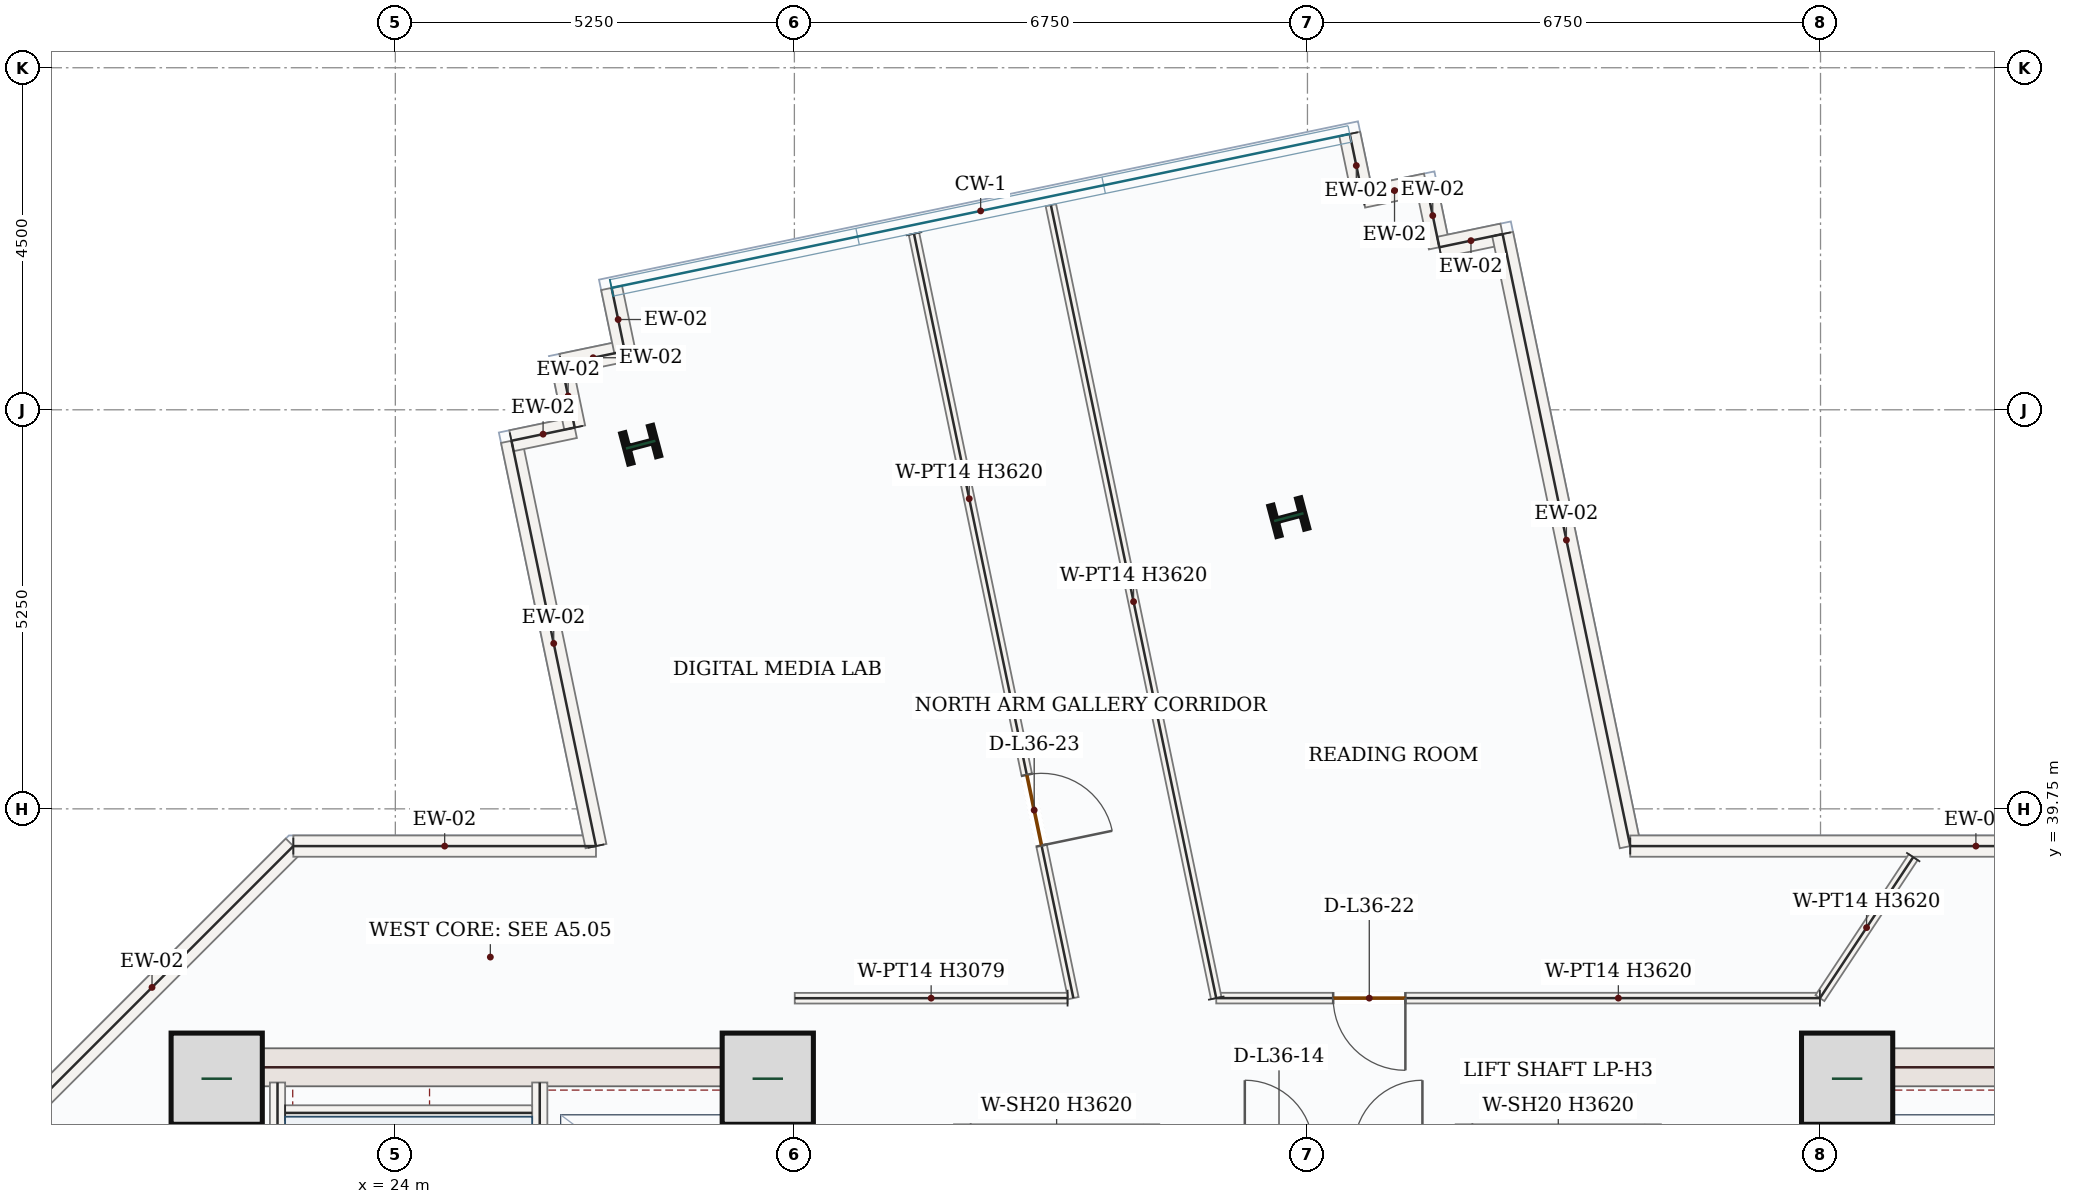
"""IFC4 building model, lengths in metres.
Left out: names, types, materials, properties, quantities, classifications, styles, units other than length and angle.
Written with IfcOpenShell. Run it as: python <this file> out.ifc"""

import sys

from ifc_helpers import new_model, si_unit, direction, frame, frame_2d, origin, origin_2d, place, context, subcontext, project, spatial, rectangle, i_section, extrude, source, transform, mapped, element, fill, save


model = new_model("IFC4")
c1 = context("Model", 3, precision=1e-05, world=origin(), true_north=direction((0.0, 1.0)))
c2 = subcontext(c1, "Body", "Model", "MODEL_VIEW")
j1 = project(units=[si_unit("LENGTHUNIT", "METRE"), si_unit("PLANEANGLEUNIT", "RADIAN")], contexts=[c1])
p1 = place(None, origin())
s1 = spatial("IfcSite", under=j1, at=p1, CompositionType="ELEMENT")
p2 = place(p1, origin())
s2 = spatial("IfcBuilding", under=s1, at=p2, CompositionType="ELEMENT")
p3 = place(p2, frame((0.0, 0.0, 159.0)))
s3 = spatial("IfcBuildingStorey", under=s2, at=p3, CompositionType="ELEMENT", Elevation=159.0)
m1 = source(origin(), c2, "Body", "SweptSolid", [
    extrude(rectangle(XDim=8.55, YDim=0.5, at=frame_2d((4.275, 0.0))), origin(), (0.0, 0.0, 1.0), 3.62),
])
p4 = place(p3, frame((21.5, 28.05, 0.0), z_axis=(0.0, 0.0, 1.0), x_axis=(0.0, 1.0, 0.0)))
e1 = element("IfcWall", 1, at=p4, inside=s3, PredefinedType="SHEAR", context=c2, shape_type="MappedRepresentation", body=[
    mapped(m1, transform((0.0, 0.0, 0.0), x_axis=(1.0, 0.0, 0.0), y_axis=(0.0, 1.0, 0.0), z_axis=(0.0, 0.0, 1.0), scale=1.0)),
])
p5 = place(p3, frame((29.0, 28.05, 0.0), z_axis=(0.0, 0.0, 1.0), x_axis=(0.0, 1.0, 0.0)))
e2 = element("IfcWall", 2, at=p5, inside=s3, PredefinedType="SHEAR", context=c2, shape_type="SweptSolid", body=[
    extrude(rectangle(XDim=8.55, YDim=0.5, at=frame_2d((4.275, 0.0))), origin(), (0.0, 0.0, 1.0), 3.62),
])
p6 = place(p5, frame((1.5, 0.0, 0.0)))
e3 = element("IfcOpeningElement", 3, at=p6, cuts=e2, PredefinedType="OPENING", context=c2, shape_type="SweptSolid", body=[
    extrude(rectangle(XDim=1.1, YDim=2.2, at=frame_2d((0.55, 1.1))), frame((0.0, 0.26, 0.0), z_axis=(0.0, -1.0, 0.0), x_axis=(1.0, 0.0, 0.0)), (0.0, 0.0, 1.0), 0.52),
])
m2 = source(origin(), c2, "Body", "SweptSolid", [
    extrude(rectangle(XDim=7.0, YDim=0.5, at=frame_2d((3.5, 0.0))), origin(), (0.0, 0.0, 1.0), 3.62),
])
p7 = place(p3, frame((21.75, 36.35, 0.0), z_axis=(0.0, 0.0, 1.0), x_axis=(1.0, 0.0, 0.0)))
e4 = element("IfcWall", 4, at=p7, inside=s3, PredefinedType="SHEAR", context=c2, shape_type="MappedRepresentation", body=[
    mapped(m2, transform((0.0, 0.0, 0.0), x_axis=(1.0, 0.0, 0.0), y_axis=(0.0, 1.0, 0.0), z_axis=(0.0, 0.0, 1.0), scale=1.0)),
])
p8 = place(p3, frame((43.0, 28.05, 0.0), z_axis=(0.0, 0.0, 1.0), x_axis=(0.0, 1.0, 0.0)))
e5 = element("IfcWall", 5, at=p8, inside=s3, PredefinedType="SHEAR", context=c2, shape_type="SweptSolid", body=[
    extrude(rectangle(XDim=8.55, YDim=0.5, at=frame_2d((4.275, 0.0))), origin(), (0.0, 0.0, 1.0), 3.62),
])
p9 = place(p8, frame((1.5, 0.0, 0.0)))
e6 = element("IfcOpeningElement", 6, at=p9, cuts=e5, PredefinedType="OPENING", context=c2, shape_type="SweptSolid", body=[
    extrude(rectangle(XDim=1.1, YDim=2.2, at=frame_2d((0.55, 1.1))), frame((0.0, 0.26, 0.0), z_axis=(0.0, -1.0, 0.0), x_axis=(1.0, 0.0, 0.0)), (0.0, 0.0, 1.0), 0.52),
])
p10 = place(p3, frame((43.25, 36.35, 0.0), z_axis=(0.0, 0.0, 1.0), x_axis=(1.0, 0.0, 0.0)))
e7 = element("IfcWall", 7, at=p10, inside=s3, PredefinedType="SHEAR", context=c2, shape_type="MappedRepresentation", body=[
    mapped(m2, transform((0.0, 0.0, 0.0), x_axis=(1.0, 0.0, 0.0), y_axis=(0.0, 1.0, 0.0), z_axis=(0.0, 0.0, 1.0), scale=1.0)),
])
m3 = source(origin(), c2, "Body", "SweptSolid", [
    extrude(rectangle(XDim=1.2, YDim=1.2, at=origin_2d()), origin(), (0.0, 0.0, 1.0), 3.9),
])
for number, where, z_axis, x_axis in (
    (8, (21.65, 36.2, 0.0), (0.0, 0.0, 1.0), (1.0, 0.0, 0.0)),
    (9, (28.9, 36.2, 0.0), (0.0, 0.0, 1.0), (1.0, 0.0, 0.0)),
    (10, (43.1, 36.2, 0.0), (0.0, 0.0, 1.0), (1.0, 0.0, 0.0)),
):
    element("IfcColumn", number, at=place(p3, frame(where, z_axis=z_axis, x_axis=x_axis)), inside=s3, PredefinedType="COLUMN", context=c2, shape_type="MappedRepresentation", body=[
        mapped(m3, transform((0.0, 0.0, 0.0), x_axis=(1.0, 0.0, 0.0), y_axis=(0.0, 1.0, 0.0), z_axis=(0.0, 0.0, 1.0), scale=1.0)),
    ])
m4 = source(origin(), c2, "Body", "SweptSolid", [
    extrude(i_section(OverallWidth=0.412, OverallDepth=0.435, WebThickness=0.036, FlangeThickness=0.057, FilletRadius=0.018, at=origin_2d()), origin(), (0.0, 0.0, 1.0), 3.9),
])
for number, where, z_axis, x_axis in (
    (11, (35.755, 43.588, 0.0), (0.0, 0.0, 1.0), (-0.255, 0.967, 0.0)),
    (12, (27.228, 44.541, 0.0), (0.0, 0.0, 1.0), (-0.255, 0.967, 0.0)),
):
    element("IfcColumn", number, at=place(p3, frame(where, z_axis=z_axis, x_axis=x_axis)), inside=s3, PredefinedType="COLUMN", context=c2, shape_type="MappedRepresentation", body=[
        mapped(m4, transform((0.0, 0.0, 0.0), x_axis=(1.0, 0.0, 0.0), y_axis=(0.0, 1.0, 0.0), z_axis=(0.0, 0.0, 1.0), scale=1.0)),
    ])
m5 = source(origin(), c2, "Body", "SweptSolid", [
    extrude(rectangle(XDim=5.258, YDim=0.28, at=frame_2d((2.629, 0.0))), origin(), (0.0, 0.0, 1.0), 3.62),
])
p11 = place(p3, frame((18.94, 35.542, 0.0), z_axis=(0.0, 0.0, 1.0), x_axis=(0.707106781187, 0.707106781187, 0.0)))
e13 = element("IfcWall", 13, at=p11, inside=s3, PredefinedType="SOLIDWALL", context=c2, shape_type="MappedRepresentation", body=[
    mapped(m5, transform((0.0, 0.0, 0.0), x_axis=(1.0, 0.0, 0.0), y_axis=(0.0, 1.0, 0.0), z_axis=(0.0, 0.0, 1.0), scale=1.0)),
])
m6 = source(origin(), c2, "Body", "SweptSolid", [
    extrude(rectangle(XDim=3.982, YDim=0.28, at=frame_2d((1.991, 0.0))), origin(), (0.0, 0.0, 1.0), 3.62),
])
p12 = place(p3, frame((22.658, 39.26, 0.0), z_axis=(0.0, 0.0, 1.0), x_axis=(1.0, 0.0, 0.0)))
e14 = element("IfcWall", 14, at=p12, inside=s3, PredefinedType="SOLIDWALL", context=c2, shape_type="MappedRepresentation", body=[
    mapped(m6, transform((0.0, 0.0, 0.0), x_axis=(1.0, 0.0, 0.0), y_axis=(0.0, 1.0, 0.0), z_axis=(0.0, 0.0, 1.0), scale=1.0)),
])
m7 = source(origin(), c2, "Body", "SweptSolid", [
    extrude(rectangle(XDim=5.447, YDim=0.28, at=frame_2d((2.724, 0.0))), origin(), (0.0, 0.0, 1.0), 3.62),
])
p13 = place(p3, frame((26.64, 39.26, 0.0), z_axis=(0.0, 0.0, 1.0), x_axis=(-0.204151126022, 0.978939384101, 0.0)))
e15 = element("IfcWall", 15, at=p13, inside=s3, PredefinedType="SOLIDWALL", context=c2, shape_type="MappedRepresentation", body=[
    mapped(m7, transform((0.0, 0.0, 0.0), x_axis=(1.0, 0.0, 0.0), y_axis=(0.0, 1.0, 0.0), z_axis=(0.0, 0.0, 1.0), scale=1.0)),
])
m8 = source(origin(), c2, "Body", "SweptSolid", [
    extrude(rectangle(XDim=0.85, YDim=0.28, at=frame_2d((0.425, 0.0))), origin(), (0.0, 0.0, 1.0), 3.62),
])
for number, where, z_axis, x_axis in (
    (16, (25.528, 44.593, 0.0), (0.0, 0.0, 1.0), (0.979, 0.204, 0.0)),
    (17, (26.36, 44.766, 0.0), (0.0, 0.0, 1.0), (-0.204, 0.979, 0.0)),
):
    element("IfcWall", number, at=place(p3, frame(where, z_axis=z_axis, x_axis=x_axis)), inside=s3, PredefinedType="SOLIDWALL", context=c2, shape_type="MappedRepresentation", body=[
        mapped(m8, transform((0.0, 0.0, 0.0), x_axis=(1.0, 0.0, 0.0), y_axis=(0.0, 1.0, 0.0), z_axis=(0.0, 0.0, 1.0), scale=1.0)),
    ])
m9 = source(origin(), c2, "Body", "SweptSolid", [
    extrude(rectangle(XDim=0.85, YDim=0.28, at=frame_2d((0.425, 0.0))), origin(), (0.0, 0.0, 1.0), 3.62),
])
p14 = place(p3, frame((26.186, 45.598, 0.0), z_axis=(0.0, 0.0, 1.0), x_axis=(0.97893500384, 0.204172128991, 0.0)))
e18 = element("IfcWall", 18, at=p14, inside=s3, PredefinedType="SOLIDWALL", context=c2, shape_type="MappedRepresentation", body=[
    mapped(m9, transform((0.0, 0.0, 0.0), x_axis=(1.0, 0.0, 0.0), y_axis=(0.0, 1.0, 0.0), z_axis=(0.0, 0.0, 1.0), scale=1.0)),
])
for number, where, z_axis, x_axis in (
    (19, (27.019, 45.772, 0.0), (0.0, 0.0, 1.0), (-0.204, 0.979, 0.0)),
    (20, (36.556, 48.629, 0.0), (0.0, 0.0, 1.0), (0.204, -0.979, 0.0)),
    (21, (36.729, 47.797, 0.0), (0.0, 0.0, 1.0), (0.979, 0.204, 0.0)),
    (22, (37.562, 47.97, 0.0), (0.0, 0.0, 1.0), (0.204, -0.979, 0.0)),
):
    element("IfcWall", number, at=place(p3, frame(where, z_axis=z_axis, x_axis=x_axis)), inside=s3, PredefinedType="SOLIDWALL", context=c2, shape_type="MappedRepresentation", body=[
        mapped(m8, transform((0.0, 0.0, 0.0), x_axis=(1.0, 0.0, 0.0), y_axis=(0.0, 1.0, 0.0), z_axis=(0.0, 0.0, 1.0), scale=1.0)),
    ])
p15 = place(p3, frame((37.735, 47.138, 0.0), z_axis=(0.0, 0.0, 1.0), x_axis=(0.97893500384, 0.204172128991, 0.0)))
e23 = element("IfcWall", 23, at=p15, inside=s3, PredefinedType="SOLIDWALL", context=c2, shape_type="MappedRepresentation", body=[
    mapped(m9, transform((0.0, 0.0, 0.0), x_axis=(1.0, 0.0, 0.0), y_axis=(0.0, 1.0, 0.0), z_axis=(0.0, 0.0, 1.0), scale=1.0)),
])
m10 = source(origin(), c2, "Body", "SweptSolid", [
    extrude(rectangle(XDim=8.225, YDim=0.28, at=frame_2d((4.113, 0.0))), origin(), (0.0, 0.0, 1.0), 3.62),
])
p16 = place(p3, frame((38.567, 47.312, 0.0), z_axis=(0.0, 0.0, 1.0), x_axis=(0.204152195211, -0.978939161128, 0.0)))
e24 = element("IfcWall", 24, at=p16, inside=s3, PredefinedType="SOLIDWALL", context=c2, shape_type="MappedRepresentation", body=[
    mapped(m10, transform((0.0, 0.0, 0.0), x_axis=(1.0, 0.0, 0.0), y_axis=(0.0, 1.0, 0.0), z_axis=(0.0, 0.0, 1.0), scale=1.0)),
])
m11 = source(origin(), c2, "Body", "SweptSolid", [
    extrude(rectangle(XDim=9.095, YDim=0.28, at=frame_2d((4.548, 0.0))), origin(), (0.0, 0.0, 1.0), 3.62),
])
p17 = place(p3, frame((40.247, 39.26, 0.0), z_axis=(0.0, 0.0, 1.0), x_axis=(1.0, 0.0, 0.0)))
e25 = element("IfcWall", 25, at=p17, inside=s3, PredefinedType="SOLIDWALL", context=c2, shape_type="MappedRepresentation", body=[
    mapped(m11, transform((0.0, 0.0, 0.0), x_axis=(1.0, 0.0, 0.0), y_axis=(0.0, 1.0, 0.0), z_axis=(0.0, 0.0, 1.0), scale=1.0)),
])
m12 = source(origin(), c2, "Body", "SweptSolid", [
    extrude(rectangle(XDim=7.87, YDim=0.2, at=frame_2d((3.935, 0.0))), origin(), (0.0, 0.0, 1.0), 3.62),
])
p18 = place(p3, frame((22.45, 28.28, 0.0), z_axis=(0.0, 0.0, 1.0), x_axis=(0.0, 1.0, 0.0)))
e26 = element("IfcWall", 26, at=p18, inside=s3, PredefinedType="SOLIDWALL", context=c2, shape_type="MappedRepresentation", body=[
    mapped(m12, transform((0.0, 0.0, 0.0), x_axis=(1.0, 0.0, 0.0), y_axis=(0.0, 1.0, 0.0), z_axis=(0.0, 0.0, 1.0), scale=1.0)),
])
p19 = place(p3, frame((25.9, 28.15, 0.0), z_axis=(0.0, 0.0, 1.0), x_axis=(0.0, 1.0, 0.0)))
e27 = element("IfcWall", 27, at=p19, inside=s3, PredefinedType="SOLIDWALL", context=c2, shape_type="SweptSolid", body=[
    extrude(rectangle(XDim=8.0, YDim=0.2, at=frame_2d((4.0, 0.0))), origin(), (0.0, 0.0, 1.0), 3.62),
])
p20 = place(p19, frame((0.4, 0.0, 0.0)))
e28 = element("IfcOpeningElement", 28, at=p20, cuts=e27, PredefinedType="OPENING", context=c2, shape_type="SweptSolid", body=[
    extrude(rectangle(XDim=1.05, YDim=2.15, at=frame_2d((0.525, 1.075))), frame((0.0, 0.11, 0.0), z_axis=(0.0, -1.0, 0.0), x_axis=(1.0, 0.0, 0.0)), (0.0, 0.0, 1.0), 0.22),
])
m13 = source(origin(), c2, "Body", "SweptSolid", [
    extrude(rectangle(XDim=3.25, YDim=0.2, at=frame_2d((1.625, 0.0))), origin(), (0.0, 0.0, 1.0), 3.62),
])
p21 = place(p3, frame((22.55, 35.75, 0.0), z_axis=(0.0, 0.0, 1.0), x_axis=(1.0, 0.0, 0.0)))
e29 = element("IfcWall", 29, at=p21, inside=s3, PredefinedType="SOLIDWALL", context=c2, shape_type="MappedRepresentation", body=[
    mapped(m13, transform((0.0, 0.0, 0.0), x_axis=(1.0, 0.0, 0.0), y_axis=(0.0, 1.0, 0.0), z_axis=(0.0, 0.0, 1.0), scale=1.0)),
])
m14 = source(origin(), c2, "Body", "SweptSolid", [
    extrude(rectangle(XDim=2.4, YDim=0.2, at=frame_2d((1.2, 0.0))), origin(), (0.0, 0.0, 1.0), 3.62),
])
for number, where, z_axis, x_axis in (
    (30, (31.45, 33.2, 0.0), (0.0, 0.0, 1.0), (0.0, 1.0, 0.0)),
    (31, (33.95, 33.2, 0.0), (0.0, 0.0, 1.0), (0.0, 1.0, 0.0)),
    (32, (38.05, 33.2, 0.0), (0.0, 0.0, 1.0), (0.0, 1.0, 0.0)),
    (33, (40.55, 33.2, 0.0), (0.0, 0.0, 1.0), (0.0, 1.0, 0.0)),
):
    element("IfcWall", number, at=place(p3, frame(where, z_axis=z_axis, x_axis=x_axis)), inside=s3, PredefinedType="SOLIDWALL", context=c2, shape_type="MappedRepresentation", body=[
        mapped(m14, transform((0.0, 0.0, 0.0), x_axis=(1.0, 0.0, 0.0), y_axis=(0.0, 1.0, 0.0), z_axis=(0.0, 0.0, 1.0), scale=1.0)),
    ])
p22 = place(p3, frame((42.742, 37.26, 0.0), z_axis=(0.0, 0.0, 1.0), x_axis=(-1.0, 0.0, 0.0)))
e34 = element("IfcWall", 34, at=p22, inside=s3, PredefinedType="PARTITIONING", context=c2, shape_type="SweptSolid", body=[
    extrude(rectangle(XDim=7.942, YDim=0.14, at=frame_2d((3.971, 0.0))), origin(), (0.0, 0.0, 1.0), 3.62),
])
p23 = place(p22, frame((5.454, 0.0, 0.0)))
e35 = element("IfcOpeningElement", 35, at=p23, cuts=e34, PredefinedType="OPENING", context=c2, shape_type="SweptSolid", body=[
    extrude(rectangle(XDim=0.95, YDim=2.15, at=frame_2d((0.475, 1.075))), frame((0.0, 0.08, 0.0), z_axis=(0.0, -1.0, 0.0), x_axis=(1.0, 0.0, 0.0)), (0.0, 0.0, 1.0), 0.16),
])
m15 = source(origin(), c2, "Body", "SweptSolid", [
    extrude(rectangle(XDim=10.656, YDim=0.14, at=frame_2d((5.328, 0.0))), origin(), (0.0, 0.0, 1.0), 3.62),
])
p24 = place(p3, frame((34.8, 37.26, 0.0), z_axis=(0.0, 0.0, 1.0), x_axis=(-0.204159189901, 0.978937702399, 0.0)))
e36 = element("IfcWall", 36, at=p24, inside=s3, PredefinedType="PARTITIONING", context=c2, shape_type="MappedRepresentation", body=[
    mapped(m15, transform((0.0, 0.0, 0.0), x_axis=(1.0, 0.0, 0.0), y_axis=(0.0, 1.0, 0.0), z_axis=(0.0, 0.0, 1.0), scale=1.0)),
])
m16 = source(origin(), c2, "Body", "SweptSolid", [
    extrude(rectangle(XDim=2.224, YDim=0.14, at=frame_2d((1.112, 0.0))), origin(), (0.0, 0.0, 1.0), 3.62),
])
p25 = place(p3, frame((43.969, 39.115, 0.0), z_axis=(0.0, 0.0, 1.0), x_axis=(-0.551783828078, -0.833987174405, 0.0)))
e37 = element("IfcWall", 37, at=p25, inside=s3, PredefinedType="PARTITIONING", context=c2, shape_type="MappedRepresentation", body=[
    mapped(m16, transform((0.0, 0.0, 0.0), x_axis=(1.0, 0.0, 0.0), y_axis=(0.0, 1.0, 0.0), z_axis=(0.0, 0.0, 1.0), scale=1.0)),
])
p26 = place(p3, frame((30.823, 47.316, 0.0), z_axis=(0.0, 0.0, 1.0), x_axis=(0.204130779611, -0.978943626985, 0.0)))
e38 = element("IfcWall", 38, at=p26, inside=s3, PredefinedType="PARTITIONING", context=c2, shape_type="SweptSolid", body=[
    extrude(rectangle(XDim=10.272, YDim=0.14, at=frame_2d((5.136, 0.0))), origin(), (0.0, 0.0, 1.0), 3.62),
])
p27 = place(p26, frame((7.271, 0.0, 0.0)))
e39 = element("IfcOpeningElement", 39, at=p27, cuts=e38, PredefinedType="OPENING", context=c2, shape_type="SweptSolid", body=[
    extrude(rectangle(XDim=0.95, YDim=2.15, at=frame_2d((0.475, 1.075))), frame((0.0, 0.08, 0.0), z_axis=(0.0, -1.0, 0.0), x_axis=(1.0, 0.0, 0.0)), (0.0, 0.0, 1.0), 0.16),
])
m17 = source(origin(), c2, "Body", "SweptSolid", [
    extrude(rectangle(XDim=3.589, YDim=0.14, at=frame_2d((1.794, 0.0))), origin(), (0.0, 0.0, 1.0), 3.079),
])
p28 = place(p3, frame((32.844, 37.26, 0.0), z_axis=(0.0, 0.0, 1.0), x_axis=(-0.999999942162, -0.000340112898, 0.0)))
e40 = element("IfcWall", 40, at=p28, inside=s3, PredefinedType="PARTITIONING", context=c2, shape_type="MappedRepresentation", body=[
    mapped(m17, transform((0.0, 0.0, 0.0), x_axis=(1.0, 0.0, 0.0), y_axis=(0.0, 1.0, 0.0), z_axis=(0.0, 0.0, 1.0), scale=1.0)),
])
m18 = source(origin(), c2, "Body", "SweptSolid", [
    extrude(rectangle(XDim=0.95, YDim=2.15, at=frame_2d((0.475, 1.075))), frame((0.0, 0.025, 0.0), z_axis=(0.0, -1.0, 0.0), x_axis=(1.0, 0.0, 0.0)), (0.0, 0.0, 1.0), 0.05),
])
p29 = place(p23, origin())
e41 = element("IfcDoor", 41, at=p29, inside=s3, OperationType="SINGLE_SWING_LEFT", PredefinedType="DOOR", context=c2, shape_type="MappedRepresentation", body=[
    mapped(m18, transform((0.0, 0.0, 0.0), x_axis=(1.0, 0.0, 0.0), y_axis=(0.0, 1.0, 0.0), z_axis=(0.0, 0.0, 1.0), scale=1.0)),
])
fill(e35, e41)
p30 = place(p27, origin())
e42 = element("IfcDoor", 42, at=p30, inside=s3, OperationType="SINGLE_SWING_RIGHT", PredefinedType="DOOR", context=c2, shape_type="MappedRepresentation", body=[
    mapped(m18, transform((0.0, 0.0, 0.0), x_axis=(1.0, 0.0, 0.0), y_axis=(0.0, 1.0, 0.0), z_axis=(0.0, 0.0, 1.0), scale=1.0)),
])
fill(e39, e42)
save(model, sys.argv[1])
